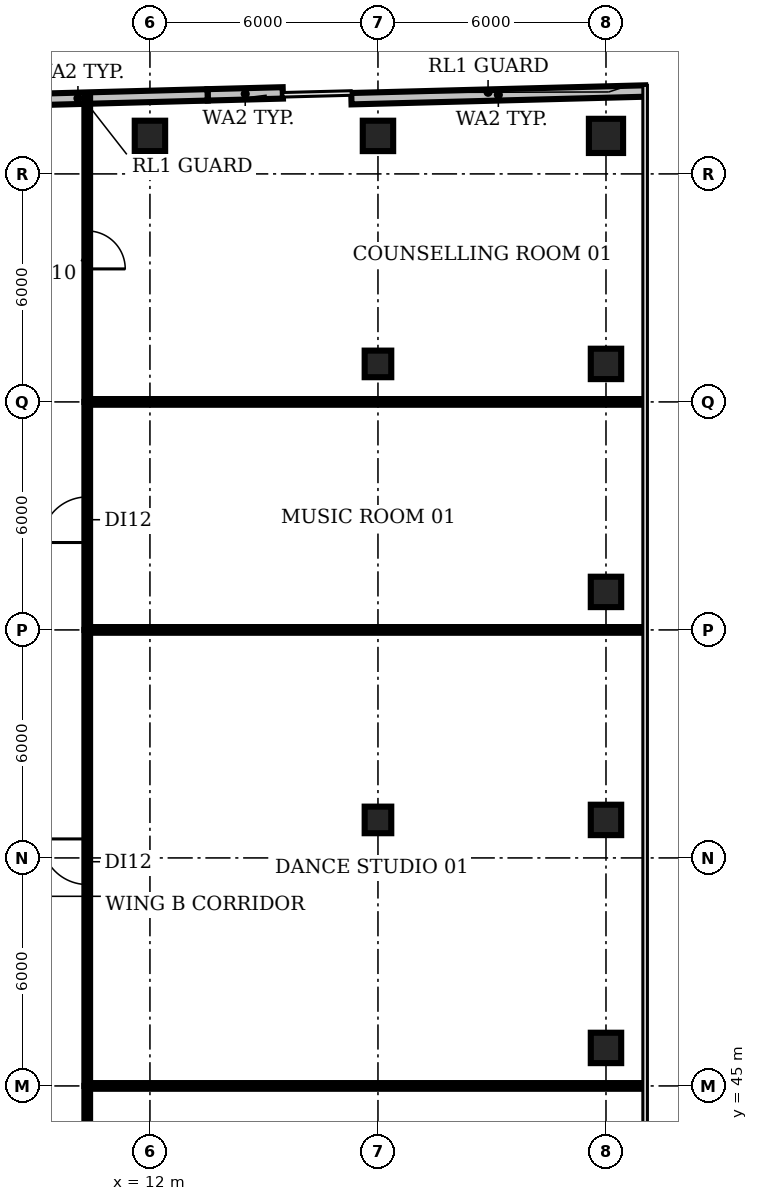
"""IFC4 building model, lengths in metres.
Left out: names, types, materials, properties, quantities, classifications, styles, units other than length and angle.
Written with IfcOpenShell. Run it as: python <this file> out.ifc"""

import sys

from ifc_helpers import new_model, si_unit, direction, frame, frame_2d, origin, origin_2d, place, context, subcontext, project, spatial, rectangle, circle, extrude, element, fill, save


model = new_model("IFC4")
c1 = context("Model", 3, precision=1e-05, world=origin(), true_north=direction((0.0, 1.0)))
c2 = subcontext(c1, "Body", "Model", "MODEL_VIEW")
j1 = project(units=[si_unit("LENGTHUNIT", "METRE"), si_unit("PLANEANGLEUNIT", "RADIAN")], contexts=[c1])
p1 = place(None, origin())
s1 = spatial("IfcSite", under=j1, at=p1, CompositionType="ELEMENT")
p2 = place(p1, origin())
s2 = spatial("IfcBuilding", under=s1, at=p2, CompositionType="ELEMENT")
p3 = place(p2, frame((0.0, 0.0, 222.2)))
s3 = spatial("IfcBuildingStorey", under=s2, at=p3, CompositionType="ELEMENT", Elevation=222.2)
p4 = place(p3, frame((12.0, 70.0, 0.0), z_axis=(0.0, 0.0, 1.0), x_axis=(1.0, 0.0, 0.0)))
e1 = element("IfcColumn", 1, at=p4, inside=s3, PredefinedType="COLUMN", context=c2, shape_type="SweptSolid", body=[
    extrude(rectangle(XDim=0.8, YDim=0.8, at=origin_2d()), origin(), (0.0, 0.0, 1.0), 3.85),
])
for number, where, z_axis, x_axis in (
    (2, (18.0, 52.0, 0.0), (0.0, 0.0, 1.0), (1.0, 0.0, 0.0)),
    (3, (18.0, 64.0, 0.0), (0.0, 0.0, 1.0), (1.0, 0.0, 0.0)),
):
    element("IfcColumn", number, at=place(p3, frame(where, z_axis=z_axis, x_axis=x_axis)), inside=s3, PredefinedType="COLUMN", context=c2, shape_type="SweptSolid", body=[
        extrude(rectangle(XDim=0.7, YDim=0.7, at=origin_2d()), origin(), (0.0, 0.0, 1.0), 3.85),
    ])
for number, where, z_axis, x_axis in (
    (4, (18.0, 70.0, 0.0), (0.0, 0.0, 1.0), (1.0, 0.0, 0.0)),
    (5, (24.0, 46.0, 0.0), (0.0, 0.0, 1.0), (1.0, 0.0, 0.0)),
    (6, (24.0, 52.0, 0.0), (0.0, 0.0, 1.0), (1.0, 0.0, 0.0)),
    (7, (24.0, 58.0, 0.0), (0.0, 0.0, 1.0), (1.0, 0.0, 0.0)),
    (8, (24.0, 64.0, 0.0), (0.0, 0.0, 1.0), (1.0, 0.0, 0.0)),
):
    element("IfcColumn", number, at=place(p3, frame(where, z_axis=z_axis, x_axis=x_axis)), inside=s3, PredefinedType="COLUMN", context=c2, shape_type="SweptSolid", body=[
        extrude(rectangle(XDim=0.8, YDim=0.8, at=origin_2d()), origin(), (0.0, 0.0, 1.0), 3.85),
    ])
p5 = place(p3, frame((24.0, 70.0, 0.0), z_axis=(0.0, 0.0, 1.0), x_axis=(1.0, 0.0, 0.0)))
e9 = element("IfcColumn", 9, at=p5, inside=s3, PredefinedType="COLUMN", context=c2, shape_type="SweptSolid", body=[
    extrude(circle(Radius=0.45, at=origin_2d()), origin(), (0.0, 0.0, 1.0), 3.85),
])
p6 = place(p3, frame((25.034, 71.181, 0.0), z_axis=(0.0, 0.0, 1.0), x_axis=(-0.999657687485, -0.026163100961, 0.0)))
e10 = element("IfcWall", 10, at=p6, inside=s3, PredefinedType="SOLIDWALL", context=c2, shape_type="SweptSolid", body=[
    extrude(rectangle(XDim=7.736, YDim=0.3, at=frame_2d((3.868, 0.0))), origin(), (0.0, 0.0, 1.0), 3.85),
])
p7 = place(p3, frame((15.496, 71.132, 0.0), z_axis=(0.0, 0.0, 1.0), x_axis=(-0.999657751572, -0.026160652183, 0.0)))
e11 = element("IfcWall", 11, at=p7, inside=s3, PredefinedType="SOLIDWALL", context=c2, shape_type="SweptSolid", body=[
    extrude(rectangle(XDim=1.979, YDim=0.3, at=frame_2d((0.989, 0.0))), origin(), (0.0, 0.0, 1.0), 3.85),
])
p8 = place(p3, frame((13.518, 71.08, 0.0), z_axis=(0.0, 0.0, 1.0), x_axis=(-0.999640403912, -0.026815347578, 0.0)))
e12 = element("IfcWall", 12, at=p8, inside=s3, PredefinedType="SOLIDWALL", context=c2, shape_type="SweptSolid", body=[
    extrude(rectangle(XDim=6.828, YDim=0.3, at=frame_2d((3.414, 0.0))), origin(), (0.0, 0.0, 1.0), 3.85),
])
p9 = place(p3, frame((10.35, 45.0, 0.0), z_axis=(0.0, 0.0, 1.0), x_axis=(0.0, -1.0, 0.0)))
e13 = element("IfcWall", 13, at=p9, inside=s3, PredefinedType="PARTITIONING", context=c2, shape_type="SweptSolid", body=[
    extrude(rectangle(XDim=6.0, YDim=0.15, at=frame_2d((3.0, 0.0))), origin(), (0.0, 0.0, 1.0), 2.88),
])
p10 = place(p9, frame((1.8, 0.0, 0.0)))
e14 = element("IfcOpeningElement", 14, at=p10, cuts=e13, PredefinedType="OPENING", context=c2, shape_type="SweptSolid", body=[
    extrude(rectangle(XDim=1.0, YDim=2.1, at=frame_2d((0.5, 1.05))), frame((0.0, 0.085, 0.0), z_axis=(0.0, -1.0, 0.0), x_axis=(1.0, 0.0, 0.0)), (0.0, 0.0, 1.0), 0.17),
])
p11 = place(p3, frame((10.35, 45.0, 0.0), z_axis=(0.0, 0.0, 1.0), x_axis=(0.0, 1.0, 0.0)))
e15 = element("IfcWall", 15, at=p11, inside=s3, PredefinedType="PARTITIONING", context=c2, shape_type="SweptSolid", body=[
    extrude(rectangle(XDim=12.0, YDim=0.15, at=frame_2d((6.0, 0.0))), origin(), (0.0, 0.0, 1.0), 2.88),
])
p12 = place(p11, frame((5.3, 0.0, 0.0)))
e16 = element("IfcOpeningElement", 16, at=p12, cuts=e15, PredefinedType="OPENING", context=c2, shape_type="SweptSolid", body=[
    extrude(rectangle(XDim=1.2, YDim=2.1, at=frame_2d((0.6, 1.05))), frame((0.0, 0.085, 0.0), z_axis=(0.0, -1.0, 0.0), x_axis=(1.0, 0.0, 0.0)), (0.0, 0.0, 1.0), 0.17),
])
p13 = place(p3, frame((10.35, 45.0, 0.0), z_axis=(0.0, 0.0, 1.0), x_axis=(1.0, 0.0, 0.0)))
e17 = element("IfcWall", 17, at=p13, inside=s3, PredefinedType="PARTITIONING", context=c2, shape_type="SweptSolid", body=[
    extrude(rectangle(XDim=14.63, YDim=0.15, at=frame_2d((7.315, 0.0))), origin(), (0.0, 0.0, 1.0), 2.88),
])
p14 = place(p3, frame((10.35, 57.0, 0.0), z_axis=(0.0, 0.0, 1.0), x_axis=(0.0, 1.0, 0.0)))
e18 = element("IfcWall", 18, at=p14, inside=s3, PredefinedType="PARTITIONING", context=c2, shape_type="SweptSolid", body=[
    extrude(rectangle(XDim=6.0, YDim=0.15, at=frame_2d((3.0, 0.0))), origin(), (0.0, 0.0, 1.0), 2.88),
])
p15 = place(p14, frame((2.3, 0.0, 0.0)))
e19 = element("IfcOpeningElement", 19, at=p15, cuts=e18, PredefinedType="OPENING", context=c2, shape_type="SweptSolid", body=[
    extrude(rectangle(XDim=1.2, YDim=2.1, at=frame_2d((0.6, 1.05))), frame((0.0, 0.085, 0.0), z_axis=(0.0, -1.0, 0.0), x_axis=(1.0, 0.0, 0.0)), (0.0, 0.0, 1.0), 0.17),
])
for number, where, z_axis, x_axis in (
    (20, (10.35, 57.0, 0.0), (0.0, 0.0, 1.0), (1.0, 0.0, 0.0)),
    (21, (10.35, 63.0, 0.0), (0.0, 0.0, 1.0), (1.0, 0.0, 0.0)),
):
    element("IfcWall", number, at=place(p3, frame(where, z_axis=z_axis, x_axis=x_axis)), inside=s3, PredefinedType="PARTITIONING", context=c2, shape_type="SweptSolid", body=[
        extrude(rectangle(XDim=14.63, YDim=0.15, at=frame_2d((7.315, 0.0))), origin(), (0.0, 0.0, 1.0), 2.88),
    ])
p16 = place(p3, frame((10.35, 71.005, 0.0), z_axis=(0.0, 0.0, 1.0), x_axis=(0.0, -1.0, 0.0)))
e22 = element("IfcWall", 22, at=p16, inside=s3, PredefinedType="PARTITIONING", context=c2, shape_type="SweptSolid", body=[
    extrude(rectangle(XDim=8.005, YDim=0.15, at=frame_2d((4.002, 0.0))), origin(), (0.0, 0.0, 1.0), 2.88),
])
p17 = place(p16, frame((3.505, 0.0, 0.0)))
e23 = element("IfcOpeningElement", 23, at=p17, cuts=e22, PredefinedType="OPENING", context=c2, shape_type="SweptSolid", body=[
    extrude(rectangle(XDim=1.0, YDim=2.1, at=frame_2d((0.5, 1.05))), frame((0.0, 0.085, 0.0), z_axis=(0.0, -1.0, 0.0), x_axis=(1.0, 0.0, 0.0)), (0.0, 0.0, 1.0), 0.17),
])
p18 = place(p12, origin())
e24 = element("IfcDoor", 24, at=p18, inside=s3, OperationType="SINGLE_SWING_RIGHT", PredefinedType="DOOR", context=c2, shape_type="SweptSolid", body=[
    extrude(rectangle(XDim=1.2, YDim=2.1, at=frame_2d((0.6, 1.05))), frame((0.0, 0.025, 0.0), z_axis=(0.0, -1.0, 0.0), x_axis=(1.0, 0.0, 0.0)), (0.0, 0.0, 1.0), 0.05),
])
fill(e16, e24)
p19 = place(p15, origin())
e25 = element("IfcDoor", 25, at=p19, inside=s3, OperationType="SINGLE_SWING_LEFT", PredefinedType="DOOR", context=c2, shape_type="SweptSolid", body=[
    extrude(rectangle(XDim=1.2, YDim=2.1, at=frame_2d((0.6, 1.05))), frame((0.0, 0.025, 0.0), z_axis=(0.0, -1.0, 0.0), x_axis=(1.0, 0.0, 0.0)), (0.0, 0.0, 1.0), 0.05),
])
fill(e19, e25)
p20 = place(p17, origin())
e26 = element("IfcDoor", 26, at=p20, inside=s3, OperationType="SINGLE_SWING_RIGHT", PredefinedType="DOOR", context=c2, shape_type="SweptSolid", body=[
    extrude(rectangle(XDim=1.0, YDim=2.1, at=frame_2d((0.5, 1.05))), frame((0.0, 0.025, 0.0), z_axis=(0.0, -1.0, 0.0), x_axis=(1.0, 0.0, 0.0)), (0.0, 0.0, 1.0), 0.05),
])
fill(e23, e26)
save(model, sys.argv[1])
